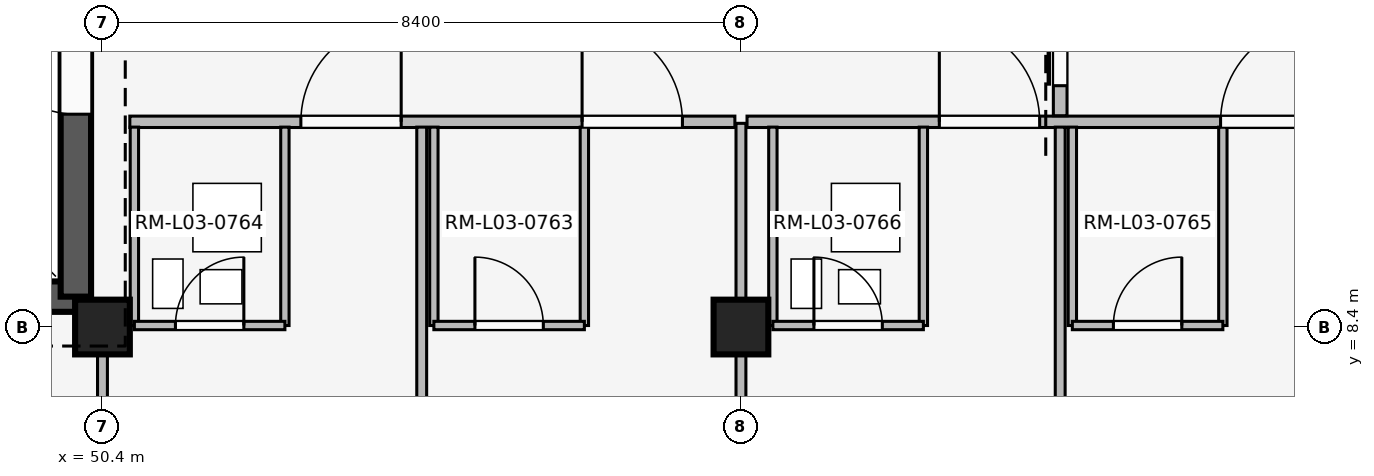
"""IFC4 building model, lengths in metres.
Left out: names, types, materials, properties, quantities, classifications, styles, units other than length and angle.
Written with IfcOpenShell. Run it as: python <this file> out.ifc"""

import sys

from ifc_helpers import new_model, si_unit, direction, frame, frame_2d, origin, origin_2d, place, context, subcontext, project, spatial, rectangle, extrude, element, fill, save


model = new_model("IFC4")
c1 = context("Model", 3, precision=1e-05, world=origin(), true_north=direction((0.0, 1.0)))
c2 = subcontext(c1, "Body", "Model", "MODEL_VIEW")
j1 = project(units=[si_unit("LENGTHUNIT", "METRE"), si_unit("PLANEANGLEUNIT", "RADIAN")], contexts=[c1])
p1 = place(None, origin())
s1 = spatial("IfcSite", under=j1, at=p1, CompositionType="ELEMENT")
p2 = place(p1, origin())
s2 = spatial("IfcBuilding", under=s1, at=p2, CompositionType="ELEMENT")
p3 = place(p2, frame((0.0, 0.0, 12.9)))
s3 = spatial("IfcBuildingStorey", under=s2, at=p3, CompositionType="ELEMENT", Elevation=12.9)
for number, where, z_axis, x_axis in (
    (1, (50.4, 8.4, 0.0), (0.0, 0.0, 1.0), (1.0, 0.0, 0.0)),
    (2, (58.8, 8.4, 0.0), (0.0, 0.0, 1.0), (1.0, 0.0, 0.0)),
):
    element("IfcColumn", number, at=place(p3, frame(where, z_axis=z_axis, x_axis=x_axis)), inside=s3, PredefinedType="COLUMN", context=c2, shape_type="SweptSolid", body=[
        extrude(rectangle(XDim=0.72, YDim=0.72, at=origin_2d()), origin(), (0.0, 0.0, 1.0), 3.3),
    ])
p4 = place(p3, frame((42.55, 8.8, 0.0), z_axis=(0.0, 0.0, 1.0), x_axis=(1.0, 0.0, 0.0)))
e3 = element("IfcWall", 3, at=p4, inside=s3, PredefinedType="SHEAR", context=c2, shape_type="SweptSolid", body=[
    extrude(rectangle(XDim=7.5, YDim=0.4, at=frame_2d((3.75, 0.0))), origin(), (0.0, 0.0, 1.0), 3.02),
])
p5 = place(p4, frame((4.85, 0.0, 0.0)))
e4 = element("IfcOpeningElement", 4, at=p5, cuts=e3, PredefinedType="OPENING", context=c2, shape_type="SweptSolid", body=[
    extrude(rectangle(XDim=1.2, YDim=2.2, at=frame_2d((0.6, 1.1))), frame((0.0, 0.21, 0.0), z_axis=(0.0, -1.0, 0.0), x_axis=(1.0, 0.0, 0.0)), (0.0, 0.0, 1.0), 0.42),
])
p6 = place(p3, frame((50.05, 8.8, 0.0), z_axis=(0.0, 0.0, 1.0), x_axis=(0.0, 1.0, 0.0)))
e5 = element("IfcWall", 5, at=p6, inside=s3, PredefinedType="SHEAR", context=c2, shape_type="SweptSolid", body=[
    extrude(rectangle(XDim=7.55, YDim=0.4, at=frame_2d((3.775, 0.0))), origin(), (0.0, 0.0, 1.0), 3.02),
])
p7 = place(p6, frame((2.4, 0.0, 0.0)))
e6 = element("IfcOpeningElement", 6, at=p7, cuts=e5, PredefinedType="OPENING", context=c2, shape_type="SweptSolid", body=[
    extrude(rectangle(XDim=1.2, YDim=2.2, at=frame_2d((0.6, 1.1))), frame((0.0, 0.21, 0.0), z_axis=(0.0, -1.0, 0.0), x_axis=(1.0, 0.0, 0.0)), (0.0, 0.0, 1.0), 0.42),
])
p8 = place(p3, frame((50.4, 0.14, 0.0), z_axis=(0.0, 0.0, 1.0), x_axis=(0.0, 1.0, 0.0)))
e7 = element("IfcWall", 7, at=p8, inside=s3, PredefinedType="PARTITIONING", context=c2, shape_type="SweptSolid", body=[
    extrude(rectangle(XDim=8.21, YDim=0.13, at=frame_2d((4.105, 0.0))), origin(), (0.0, 0.0, 1.0), 2.42),
])
p9 = place(p8, frame((3.64, 0.0, 0.0)))
e8 = element("IfcOpeningElement", 8, at=p9, cuts=e7, PredefinedType="OPENING", context=c2, shape_type="SweptSolid", body=[
    extrude(rectangle(XDim=1.08, YDim=2.15, at=frame_2d((0.54, 1.075))), frame((0.0, 0.075, 0.0), z_axis=(0.0, -1.0, 0.0), x_axis=(1.0, 0.0, 0.0)), (0.0, 0.0, 1.0), 0.15),
])
p10 = place(p3, frame((50.76, 11.1, 0.0), z_axis=(0.0, 0.0, 1.0), x_axis=(1.0, 0.0, 0.0)))
e9 = element("IfcWall", 9, at=p10, inside=s3, PredefinedType="PARTITIONING", context=c2, shape_type="SweptSolid", body=[
    extrude(rectangle(XDim=7.96, YDim=0.15, at=frame_2d((3.98, 0.0))), origin(), (0.0, 0.0, 1.0), 2.42),
])
p11 = place(p10, frame((2.25, 0.0, 0.0)))
e10 = element("IfcOpeningElement", 10, at=p11, cuts=e9, PredefinedType="OPENING", context=c2, shape_type="SweptSolid", body=[
    extrude(rectangle(XDim=1.32, YDim=2.25, at=frame_2d((0.66, 1.125))), frame((0.0, 0.085, 0.0), z_axis=(0.0, -1.0, 0.0), x_axis=(1.0, 0.0, 0.0)), (0.0, 0.0, 1.0), 0.17),
])
p12 = place(p10, frame((5.95, 0.0, 0.0)))
e11 = element("IfcOpeningElement", 11, at=p12, cuts=e9, PredefinedType="OPENING", context=c2, shape_type="SweptSolid", body=[
    extrude(rectangle(XDim=1.32, YDim=2.25, at=frame_2d((0.66, 1.125))), frame((0.0, 0.085, 0.0), z_axis=(0.0, -1.0, 0.0), x_axis=(1.0, 0.0, 0.0)), (0.0, 0.0, 1.0), 0.17),
])
p13 = place(p3, frame((54.6, 0.1, 0.0), z_axis=(0.0, 0.0, 1.0), x_axis=(0.0, 1.0, 0.0)))
e12 = element("IfcWall", 12, at=p13, inside=s3, PredefinedType="PARTITIONING", context=c2, shape_type="SweptSolid", body=[
    extrude(rectangle(XDim=10.93, YDim=0.13, at=frame_2d((5.465, 0.0))), origin(), (0.0, 0.0, 1.0), 2.42),
])
for number, where, z_axis, x_axis in (
    (13, (50.82, 8.42, 0.0), (0.0, 0.0, 1.0), (0.0, 1.0, 0.0)),
    (14, (52.8, 8.42, 0.0), (0.0, 0.0, 1.0), (0.0, 1.0, 0.0)),
):
    element("IfcWall", number, at=place(p3, frame(where, z_axis=z_axis, x_axis=x_axis)), inside=s3, PredefinedType="PARTITIONING", context=c2, shape_type="SweptSolid", body=[
        extrude(rectangle(XDim=2.61, YDim=0.11, at=frame_2d((1.305, 0.0))), origin(), (0.0, 0.0, 1.0), 2.42),
    ])
p14 = place(p3, frame((50.82, 8.42, 0.0), z_axis=(0.0, 0.0, 1.0), x_axis=(1.0, 0.0, 0.0)))
e15 = element("IfcWall", 15, at=p14, inside=s3, PredefinedType="PARTITIONING", context=c2, shape_type="SweptSolid", body=[
    extrude(rectangle(XDim=1.98, YDim=0.11, at=frame_2d((0.99, 0.0))), origin(), (0.0, 0.0, 1.0), 2.42),
])
p15 = place(p14, frame((0.54, 0.0, 0.0)))
e16 = element("IfcOpeningElement", 16, at=p15, cuts=e15, PredefinedType="OPENING", context=c2, shape_type="SweptSolid", body=[
    extrude(rectangle(XDim=0.9, YDim=2.1, at=frame_2d((0.45, 1.05))), frame((0.0, 0.065, 0.0), z_axis=(0.0, -1.0, 0.0), x_axis=(1.0, 0.0, 0.0)), (0.0, 0.0, 1.0), 0.13),
])
for number, where, z_axis, x_axis in (
    (17, (54.76, 8.42, 0.0), (0.0, 0.0, 1.0), (0.0, 1.0, 0.0)),
    (18, (56.74, 8.42, 0.0), (0.0, 0.0, 1.0), (0.0, 1.0, 0.0)),
):
    element("IfcWall", number, at=place(p3, frame(where, z_axis=z_axis, x_axis=x_axis)), inside=s3, PredefinedType="PARTITIONING", context=c2, shape_type="SweptSolid", body=[
        extrude(rectangle(XDim=2.61, YDim=0.11, at=frame_2d((1.305, 0.0))), origin(), (0.0, 0.0, 1.0), 2.42),
    ])
p16 = place(p3, frame((54.76, 8.42, 0.0), z_axis=(0.0, 0.0, 1.0), x_axis=(1.0, 0.0, 0.0)))
e19 = element("IfcWall", 19, at=p16, inside=s3, PredefinedType="PARTITIONING", context=c2, shape_type="SweptSolid", body=[
    extrude(rectangle(XDim=1.98, YDim=0.11, at=frame_2d((0.99, 0.0))), origin(), (0.0, 0.0, 1.0), 2.42),
])
p17 = place(p16, frame((0.54, 0.0, 0.0)))
e20 = element("IfcOpeningElement", 20, at=p17, cuts=e19, PredefinedType="OPENING", context=c2, shape_type="SweptSolid", body=[
    extrude(rectangle(XDim=0.9, YDim=2.1, at=frame_2d((0.45, 1.05))), frame((0.0, 0.065, 0.0), z_axis=(0.0, -1.0, 0.0), x_axis=(1.0, 0.0, 0.0)), (0.0, 0.0, 1.0), 0.13),
])
p18 = place(p3, frame((58.8, 0.14, 0.0), z_axis=(0.0, 0.0, 1.0), x_axis=(0.0, 1.0, 0.0)))
e21 = element("IfcWall", 21, at=p18, inside=s3, PredefinedType="PARTITIONING", context=c2, shape_type="SweptSolid", body=[
    extrude(rectangle(XDim=10.94, YDim=0.13, at=frame_2d((5.47, 0.0))), origin(), (0.0, 0.0, 1.0), 2.42),
])
p19 = place(p3, frame((58.88, 11.1, 0.0), z_axis=(0.0, 0.0, 1.0), x_axis=(1.0, 0.0, 0.0)))
e22 = element("IfcWall", 22, at=p19, inside=s3, PredefinedType="PARTITIONING", context=c2, shape_type="SweptSolid", body=[
    extrude(rectangle(XDim=8.24, YDim=0.15, at=frame_2d((4.12, 0.0))), origin(), (0.0, 0.0, 1.0), 2.42),
])
p20 = place(p19, frame((2.53, 0.0, 0.0)))
e23 = element("IfcOpeningElement", 23, at=p20, cuts=e22, PredefinedType="OPENING", context=c2, shape_type="SweptSolid", body=[
    extrude(rectangle(XDim=1.32, YDim=2.25, at=frame_2d((0.66, 1.125))), frame((0.0, 0.085, 0.0), z_axis=(0.0, -1.0, 0.0), x_axis=(1.0, 0.0, 0.0)), (0.0, 0.0, 1.0), 0.17),
])
p21 = place(p19, frame((6.23, 0.0, 0.0)))
e24 = element("IfcOpeningElement", 24, at=p21, cuts=e22, PredefinedType="OPENING", context=c2, shape_type="SweptSolid", body=[
    extrude(rectangle(XDim=1.32, YDim=2.25, at=frame_2d((0.66, 1.125))), frame((0.0, 0.085, 0.0), z_axis=(0.0, -1.0, 0.0), x_axis=(1.0, 0.0, 0.0)), (0.0, 0.0, 1.0), 0.17),
])
p22 = place(p3, frame((63.0, 0.1, 0.0), z_axis=(0.0, 0.0, 1.0), x_axis=(0.0, 1.0, 0.0)))
e25 = element("IfcWall", 25, at=p22, inside=s3, PredefinedType="PARTITIONING", context=c2, shape_type="SweptSolid", body=[
    extrude(rectangle(XDim=10.93, YDim=0.13, at=frame_2d((5.465, 0.0))), origin(), (0.0, 0.0, 1.0), 2.42),
])
for number, where, z_axis, x_axis in (
    (26, (59.22, 8.42, 0.0), (0.0, 0.0, 1.0), (0.0, 1.0, 0.0)),
    (27, (61.2, 8.42, 0.0), (0.0, 0.0, 1.0), (0.0, 1.0, 0.0)),
):
    element("IfcWall", number, at=place(p3, frame(where, z_axis=z_axis, x_axis=x_axis)), inside=s3, PredefinedType="PARTITIONING", context=c2, shape_type="SweptSolid", body=[
        extrude(rectangle(XDim=2.61, YDim=0.11, at=frame_2d((1.305, 0.0))), origin(), (0.0, 0.0, 1.0), 2.42),
    ])
p23 = place(p3, frame((59.22, 8.42, 0.0), z_axis=(0.0, 0.0, 1.0), x_axis=(1.0, 0.0, 0.0)))
e28 = element("IfcWall", 28, at=p23, inside=s3, PredefinedType="PARTITIONING", context=c2, shape_type="SweptSolid", body=[
    extrude(rectangle(XDim=1.98, YDim=0.11, at=frame_2d((0.99, 0.0))), origin(), (0.0, 0.0, 1.0), 2.42),
])
p24 = place(p23, frame((0.54, 0.0, 0.0)))
e29 = element("IfcOpeningElement", 29, at=p24, cuts=e28, PredefinedType="OPENING", context=c2, shape_type="SweptSolid", body=[
    extrude(rectangle(XDim=0.9, YDim=2.1, at=frame_2d((0.45, 1.05))), frame((0.0, 0.065, 0.0), z_axis=(0.0, -1.0, 0.0), x_axis=(1.0, 0.0, 0.0)), (0.0, 0.0, 1.0), 0.13),
])
for number, where, z_axis, x_axis in (
    (30, (63.16, 8.42, 0.0), (0.0, 0.0, 1.0), (0.0, 1.0, 0.0)),
    (31, (65.14, 8.42, 0.0), (0.0, 0.0, 1.0), (0.0, 1.0, 0.0)),
):
    element("IfcWall", number, at=place(p3, frame(where, z_axis=z_axis, x_axis=x_axis)), inside=s3, PredefinedType="PARTITIONING", context=c2, shape_type="SweptSolid", body=[
        extrude(rectangle(XDim=2.61, YDim=0.11, at=frame_2d((1.305, 0.0))), origin(), (0.0, 0.0, 1.0), 2.42),
    ])
p25 = place(p3, frame((63.16, 8.42, 0.0), z_axis=(0.0, 0.0, 1.0), x_axis=(1.0, 0.0, 0.0)))
e32 = element("IfcWall", 32, at=p25, inside=s3, PredefinedType="PARTITIONING", context=c2, shape_type="SweptSolid", body=[
    extrude(rectangle(XDim=1.98, YDim=0.11, at=frame_2d((0.99, 0.0))), origin(), (0.0, 0.0, 1.0), 2.42),
])
p26 = place(p25, frame((0.54, 0.0, 0.0)))
e33 = element("IfcOpeningElement", 33, at=p26, cuts=e32, PredefinedType="OPENING", context=c2, shape_type="SweptSolid", body=[
    extrude(rectangle(XDim=0.9, YDim=2.1, at=frame_2d((0.45, 1.05))), frame((0.0, 0.065, 0.0), z_axis=(0.0, -1.0, 0.0), x_axis=(1.0, 0.0, 0.0)), (0.0, 0.0, 1.0), 0.13),
])
p27 = place(p3, frame((63.0, 11.18, 0.0), z_axis=(0.0, 0.0, 1.0), x_axis=(0.0, 1.0, 0.0)))
e34 = element("IfcWall", 34, at=p27, inside=s3, PredefinedType="PARTITIONING", context=c2, shape_type="SweptSolid", body=[
    extrude(rectangle(XDim=2.84, YDim=0.18, at=frame_2d((1.42, 0.0))), origin(), (0.0, 0.0, 1.0), 2.42),
])
p28 = place(p27, frame((0.395, 0.0, 0.0)))
e35 = element("IfcOpeningElement", 35, at=p28, cuts=e34, PredefinedType="OPENING", context=c2, shape_type="SweptSolid", body=[
    extrude(rectangle(XDim=2.05, YDim=2.35, at=frame_2d((1.025, 1.175))), frame((0.0, 0.1, 0.0), z_axis=(0.0, -1.0, 0.0), x_axis=(1.0, 0.0, 0.0)), (0.0, 0.0, 1.0), 0.2),
])
p29 = place(p7, origin())
e36 = element("IfcDoor", 36, at=p29, inside=s3, OperationType="SINGLE_SWING_RIGHT", PredefinedType="DOOR", context=c2, shape_type="SweptSolid", body=[
    extrude(rectangle(XDim=1.2, YDim=2.2, at=frame_2d((0.6, 1.1))), frame((0.0, 0.025, 0.0), z_axis=(0.0, -1.0, 0.0), x_axis=(1.0, 0.0, 0.0)), (0.0, 0.0, 1.0), 0.05),
])
fill(e6, e36)
p30 = place(p11, origin())
e37 = element("IfcDoor", 37, at=p30, inside=s3, OperationType="SINGLE_SWING_RIGHT", PredefinedType="DOOR", context=c2, shape_type="SweptSolid", body=[
    extrude(rectangle(XDim=1.32, YDim=2.25, at=frame_2d((0.66, 1.125))), frame((0.0, 0.025, 0.0), z_axis=(0.0, -1.0, 0.0), x_axis=(1.0, 0.0, 0.0)), (0.0, 0.0, 1.0), 0.05),
])
fill(e10, e37)
p31 = place(p12, origin())
e38 = element("IfcDoor", 38, at=p31, inside=s3, OperationType="SINGLE_SWING_LEFT", PredefinedType="DOOR", context=c2, shape_type="SweptSolid", body=[
    extrude(rectangle(XDim=1.32, YDim=2.25, at=frame_2d((0.66, 1.125))), frame((0.0, 0.025, 0.0), z_axis=(0.0, -1.0, 0.0), x_axis=(1.0, 0.0, 0.0)), (0.0, 0.0, 1.0), 0.05),
])
fill(e11, e38)
p32 = place(p15, origin())
e39 = element("IfcDoor", 39, at=p32, inside=s3, OperationType="SINGLE_SWING_RIGHT", PredefinedType="DOOR", context=c2, shape_type="SweptSolid", body=[
    extrude(rectangle(XDim=0.9, YDim=2.1, at=frame_2d((0.45, 1.05))), frame((0.0, 0.025, 0.0), z_axis=(0.0, -1.0, 0.0), x_axis=(1.0, 0.0, 0.0)), (0.0, 0.0, 1.0), 0.05),
])
fill(e16, e39)
p33 = place(p17, origin())
e40 = element("IfcDoor", 40, at=p33, inside=s3, OperationType="SINGLE_SWING_LEFT", PredefinedType="DOOR", context=c2, shape_type="SweptSolid", body=[
    extrude(rectangle(XDim=0.9, YDim=2.1, at=frame_2d((0.45, 1.05))), frame((0.0, 0.025, 0.0), z_axis=(0.0, -1.0, 0.0), x_axis=(1.0, 0.0, 0.0)), (0.0, 0.0, 1.0), 0.05),
])
fill(e20, e40)
p34 = place(p20, origin())
e41 = element("IfcDoor", 41, at=p34, inside=s3, OperationType="SINGLE_SWING_LEFT", PredefinedType="DOOR", context=c2, shape_type="SweptSolid", body=[
    extrude(rectangle(XDim=1.32, YDim=2.25, at=frame_2d((0.66, 1.125))), frame((0.0, 0.025, 0.0), z_axis=(0.0, -1.0, 0.0), x_axis=(1.0, 0.0, 0.0)), (0.0, 0.0, 1.0), 0.05),
])
fill(e23, e41)
p35 = place(p21, origin())
e42 = element("IfcDoor", 42, at=p35, inside=s3, OperationType="SINGLE_SWING_RIGHT", PredefinedType="DOOR", context=c2, shape_type="SweptSolid", body=[
    extrude(rectangle(XDim=1.32, YDim=2.25, at=frame_2d((0.66, 1.125))), frame((0.0, 0.025, 0.0), z_axis=(0.0, -1.0, 0.0), x_axis=(1.0, 0.0, 0.0)), (0.0, 0.0, 1.0), 0.05),
])
fill(e24, e42)
p36 = place(p24, origin())
e43 = element("IfcDoor", 43, at=p36, inside=s3, OperationType="SINGLE_SWING_LEFT", PredefinedType="DOOR", context=c2, shape_type="SweptSolid", body=[
    extrude(rectangle(XDim=0.9, YDim=2.1, at=frame_2d((0.45, 1.05))), frame((0.0, 0.025, 0.0), z_axis=(0.0, -1.0, 0.0), x_axis=(1.0, 0.0, 0.0)), (0.0, 0.0, 1.0), 0.05),
])
fill(e29, e43)
p37 = place(p26, origin())
e44 = element("IfcDoor", 44, at=p37, inside=s3, OperationType="SINGLE_SWING_RIGHT", PredefinedType="DOOR", context=c2, shape_type="SweptSolid", body=[
    extrude(rectangle(XDim=0.9, YDim=2.1, at=frame_2d((0.45, 1.05))), frame((0.0, 0.025, 0.0), z_axis=(0.0, -1.0, 0.0), x_axis=(1.0, 0.0, 0.0)), (0.0, 0.0, 1.0), 0.05),
])
fill(e33, e44)
p38 = place(p28, origin())
e45 = element("IfcDoor", 45, at=p38, inside=s3, OperationType="SLIDING_TO_LEFT", PredefinedType="DOOR", context=c2, shape_type="SweptSolid", body=[
    extrude(rectangle(XDim=2.05, YDim=2.35, at=frame_2d((1.025, 1.175))), frame((0.0, 0.025, 0.0), z_axis=(0.0, -1.0, 0.0), x_axis=(1.0, 0.0, 0.0)), (0.0, 0.0, 1.0), 0.05),
])
fill(e35, e45)
save(model, sys.argv[1])
